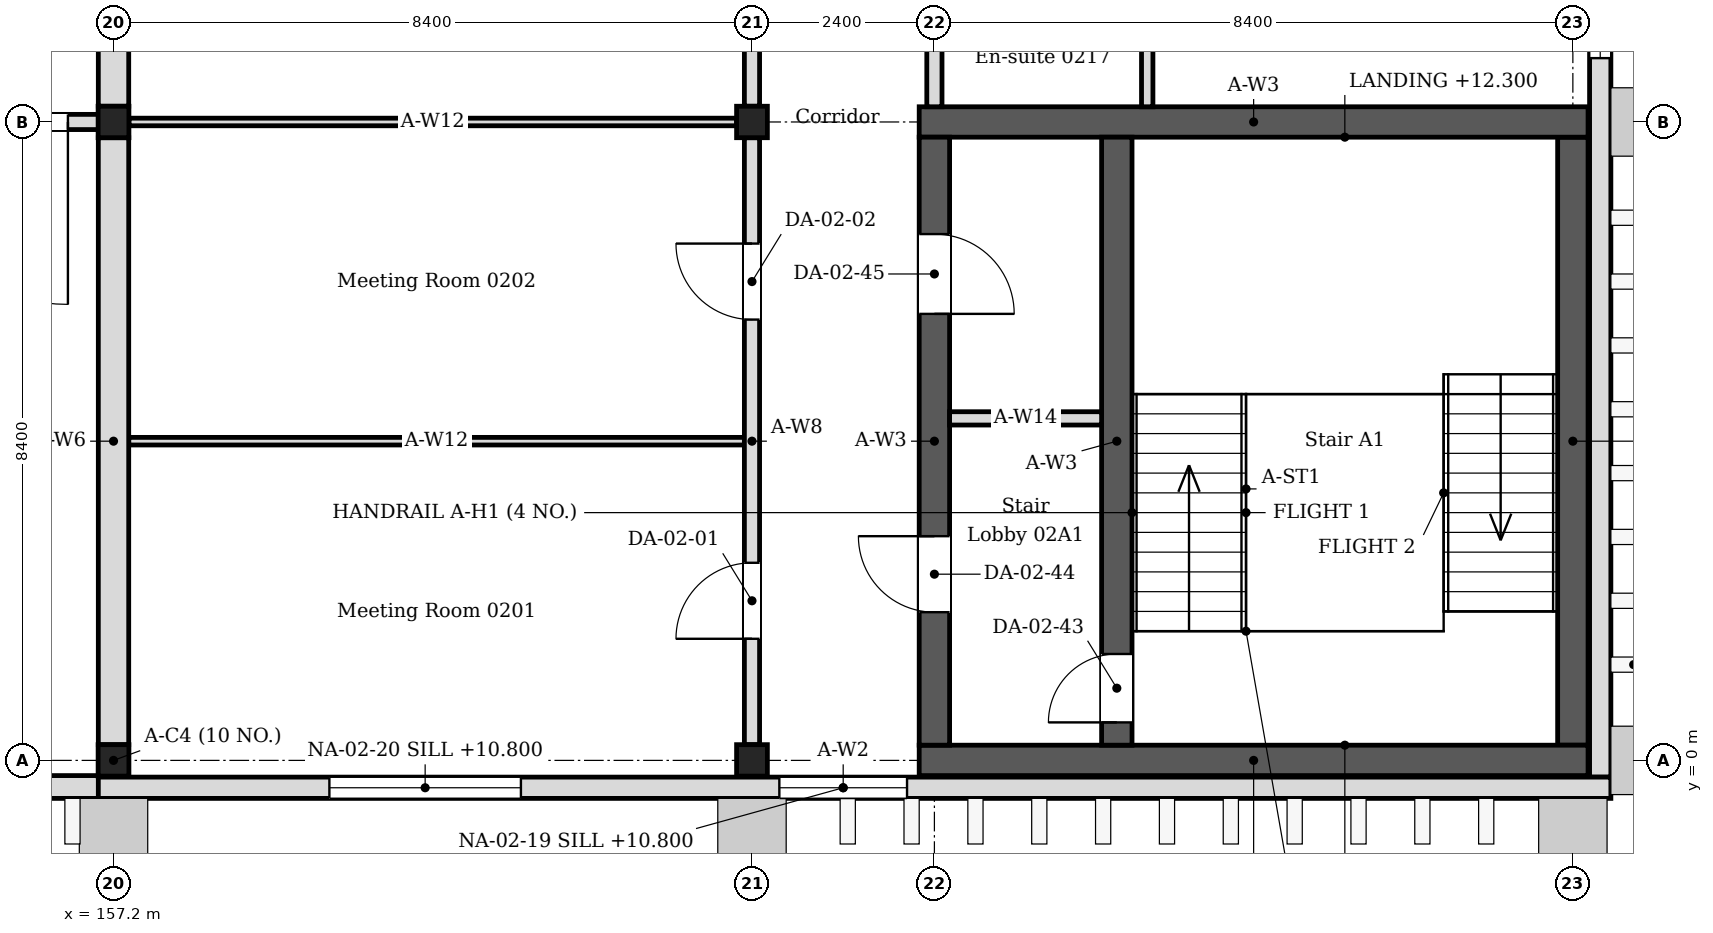
"""IFC4 building model, lengths in metres.
Left out: names, types, materials, properties, quantities, classifications, styles, units other than length and angle.
Written with IfcOpenShell. Run it as: python <this file> out.ifc"""

import sys

from ifc_helpers import new_model, si_unit, direction, frame, frame_2d, origin, origin_2d, place, context, subcontext, project, spatial, rectangle, i_section, extrude, element, fill, save


model = new_model("IFC4")
c1 = context("Model", 3, precision=1e-05, world=origin(), true_north=direction((0.0, 1.0)))
c2 = subcontext(c1, "Body", "Model", "MODEL_VIEW")
j1 = project(units=[si_unit("LENGTHUNIT", "METRE"), si_unit("PLANEANGLEUNIT", "RADIAN")], contexts=[c1])
p1 = place(None, origin())
s1 = spatial("IfcSite", under=j1, at=p1, CompositionType="ELEMENT")
p2 = place(p1, origin())
s2 = spatial("IfcBuilding", under=s1, at=p2, CompositionType="ELEMENT")
p3 = place(p2, frame((0.0, 0.0, 10.2)))
s3 = spatial("IfcBuildingStorey", under=s2, at=p3, CompositionType="ELEMENT", Elevation=10.2)
for number, where, z_axis, x_axis in (
    (1, (157.2, 0.0, 0.0), (0.0, 0.0, 1.0), (1.0, 0.0, 0.0)),
    (2, (157.2, 8.4, 0.0), (0.0, 0.0, 1.0), (1.0, 0.0, 0.0)),
    (3, (165.6, 0.0, 0.0), (0.0, 0.0, 1.0), (1.0, 0.0, 0.0)),
    (4, (165.6, 8.4, 0.0), (0.0, 0.0, 1.0), (1.0, 0.0, 0.0)),
):
    element("IfcColumn", number, at=place(p3, frame(where, z_axis=z_axis, x_axis=x_axis)), inside=s3, PredefinedType="COLUMN", context=c2, shape_type="SweptSolid", body=[
        extrude(i_section(OverallWidth=0.405, OverallDepth=0.414, WebThickness=0.018, FlangeThickness=0.028, FilletRadius=0.022, at=origin_2d()), origin(), (0.0, 0.0, 1.0), 4.2),
    ])
for number, where, z_axis, x_axis in (
    (5, (167.8, 0.0, 0.0), (0.0, 0.0, 1.0), (1.0, 0.0, 0.0)),
    (6, (167.8, 8.4, 0.0), (0.0, 0.0, 1.0), (1.0, 0.0, 0.0)),
):
    element("IfcWall", number, at=place(p3, frame(where, z_axis=z_axis, x_axis=x_axis)), inside=s3, PredefinedType="SOLIDWALL", context=c2, shape_type="SweptSolid", body=[
        extrude(rectangle(XDim=8.8, YDim=0.4, at=frame_2d((4.4, 0.0))), origin(), (0.0, 0.0, 1.0), 4.05),
    ])
p4 = place(p3, frame((168.0, 0.2, 0.0), z_axis=(0.0, 0.0, 1.0), x_axis=(0.0, 1.0, 0.0)))
e7 = element("IfcWall", 7, at=p4, inside=s3, PredefinedType="SOLIDWALL", context=c2, shape_type="SweptSolid", body=[
    extrude(rectangle(XDim=8.0, YDim=0.4, at=frame_2d((4.0, 0.0))), origin(), (0.0, 0.0, 1.0), 4.05),
])
p5 = place(p4, frame((1.75, 0.0, 0.0)))
e8 = element("IfcOpeningElement", 8, at=p5, cuts=e7, PredefinedType="OPENING", context=c2, shape_type="SweptSolid", body=[
    extrude(rectangle(XDim=1.0, YDim=2.1, at=frame_2d((0.5, 1.05))), frame((0.0, 0.21, 0.0), z_axis=(0.0, -1.0, 0.0), x_axis=(1.0, 0.0, 0.0)), (0.0, 0.0, 1.0), 0.42),
])
p6 = place(p4, frame((5.675, 0.0, 0.0)))
e9 = element("IfcOpeningElement", 9, at=p6, cuts=e7, PredefinedType="OPENING", context=c2, shape_type="SweptSolid", body=[
    extrude(rectangle(XDim=1.05, YDim=2.1, at=frame_2d((0.525, 1.05))), frame((0.0, 0.21, 0.0), z_axis=(0.0, -1.0, 0.0), x_axis=(1.0, 0.0, 0.0)), (0.0, 0.0, 1.0), 0.42),
])
p7 = place(p3, frame((176.4, 0.2, 0.0), z_axis=(0.0, 0.0, 1.0), x_axis=(0.0, 1.0, 0.0)))
e10 = element("IfcWall", 10, at=p7, inside=s3, PredefinedType="SOLIDWALL", context=c2, shape_type="SweptSolid", body=[
    extrude(rectangle(XDim=8.0, YDim=0.4, at=frame_2d((4.0, 0.0))), origin(), (0.0, 0.0, 1.0), 4.05),
])
p8 = place(p3, frame((176.76, -0.22, 0.0), z_axis=(0.0, 0.0, 1.0), x_axis=(0.0, 1.0, 0.0)))
e11 = element("IfcWall", 11, at=p8, inside=s3, PredefinedType="SOLIDWALL", context=c2, shape_type="SweptSolid", body=[
    extrude(rectangle(XDim=42.57, YDim=0.28, at=frame_2d((21.285, 0.0))), origin(), (0.0, 0.0, 1.0), 4.05),
])
p9 = place(p8, frame((9.46, 0.0, 0.6)))
e12 = element("IfcOpeningElement", 12, at=p9, cuts=e11, PredefinedType="OPENING", context=c2, shape_type="SweptSolid", body=[
    extrude(rectangle(XDim=2.52, YDim=2.4, at=frame_2d((1.26, 1.2))), frame((0.0, 0.15, 0.0), z_axis=(0.0, -1.0, 0.0), x_axis=(1.0, 0.0, 0.0)), (0.0, 0.0, 1.0), 0.3),
])
p10 = place(p8, frame((13.66, 0.0, 0.6)))
e13 = element("IfcOpeningElement", 13, at=p10, cuts=e11, PredefinedType="OPENING", context=c2, shape_type="SweptSolid", body=[
    extrude(rectangle(XDim=2.52, YDim=2.4, at=frame_2d((1.26, 1.2))), frame((0.0, 0.15, 0.0), z_axis=(0.0, -1.0, 0.0), x_axis=(1.0, 0.0, 0.0)), (0.0, 0.0, 1.0), 0.3),
])
p11 = place(p8, frame((17.86, 0.0, 0.6)))
e14 = element("IfcOpeningElement", 14, at=p11, cuts=e11, PredefinedType="OPENING", context=c2, shape_type="SweptSolid", body=[
    extrude(rectangle(XDim=2.52, YDim=2.4, at=frame_2d((1.26, 1.2))), frame((0.0, 0.15, 0.0), z_axis=(0.0, -1.0, 0.0), x_axis=(1.0, 0.0, 0.0)), (0.0, 0.0, 1.0), 0.3),
])
p12 = place(p8, frame((22.06, 0.0, 0.6)))
e15 = element("IfcOpeningElement", 15, at=p12, cuts=e11, PredefinedType="OPENING", context=c2, shape_type="SweptSolid", body=[
    extrude(rectangle(XDim=2.52, YDim=2.4, at=frame_2d((1.26, 1.2))), frame((0.0, 0.15, 0.0), z_axis=(0.0, -1.0, 0.0), x_axis=(1.0, 0.0, 0.0)), (0.0, 0.0, 1.0), 0.3),
])
p13 = place(p3, frame((156.7, -0.36, 0.0), z_axis=(0.0, 0.0, 1.0), x_axis=(1.0, 0.0, 0.0)))
e16 = element("IfcWall", 16, at=p13, inside=s3, PredefinedType="SOLIDWALL", context=c2, shape_type="SweptSolid", body=[
    extrude(rectangle(XDim=20.2, YDim=0.28, at=frame_2d((10.1, 0.0))), origin(), (0.0, 0.0, 1.0), 4.05),
])
p14 = place(p13, frame((9.26, 0.0, 0.6)))
e17 = element("IfcOpeningElement", 17, at=p14, cuts=e16, PredefinedType="OPENING", context=c2, shape_type="SweptSolid", body=[
    extrude(rectangle(XDim=1.68, YDim=2.4, at=frame_2d((0.84, 1.2))), frame((0.0, 0.15, 0.0), z_axis=(0.0, -1.0, 0.0), x_axis=(1.0, 0.0, 0.0)), (0.0, 0.0, 1.0), 0.3),
])
p15 = place(p13, frame((3.34, 0.0, 0.6)))
e18 = element("IfcOpeningElement", 18, at=p15, cuts=e16, PredefinedType="OPENING", context=c2, shape_type="SweptSolid", body=[
    extrude(rectangle(XDim=2.52, YDim=2.4, at=frame_2d((1.26, 1.2))), frame((0.0, 0.15, 0.0), z_axis=(0.0, -1.0, 0.0), x_axis=(1.0, 0.0, 0.0)), (0.0, 0.0, 1.0), 0.3),
])
p16 = place(p3, frame((150.8, -0.35, 0.0), z_axis=(0.0, 0.0, 1.0), x_axis=(1.0, 0.0, 0.0)))
e19 = element("IfcWall", 19, at=p16, inside=s3, PredefinedType="SOLIDWALL", context=c2, shape_type="SweptSolid", body=[
    extrude(rectangle(XDim=6.2, YDim=0.3, at=frame_2d((3.1, 0.0))), origin(), (0.0, 0.0, 1.0), 4.05),
])
p17 = place(p16, frame((0.64, 0.0, 0.3)))
e20 = element("IfcOpeningElement", 20, at=p17, cuts=e19, PredefinedType="OPENING", context=c2, shape_type="SweptSolid", body=[
    extrude(rectangle(XDim=1.2, YDim=3.3, at=frame_2d((0.6, 1.65))), frame((0.0, 0.16, 0.0), z_axis=(0.0, -1.0, 0.0), x_axis=(1.0, 0.0, 0.0)), (0.0, 0.0, 1.0), 0.32),
])
p18 = place(p16, frame((2.32, 0.0, 0.3)))
e21 = element("IfcOpeningElement", 21, at=p18, cuts=e19, PredefinedType="OPENING", context=c2, shape_type="SweptSolid", body=[
    extrude(rectangle(XDim=1.2, YDim=3.3, at=frame_2d((0.6, 1.65))), frame((0.0, 0.16, 0.0), z_axis=(0.0, -1.0, 0.0), x_axis=(1.0, 0.0, 0.0)), (0.0, 0.0, 1.0), 0.32),
])
p19 = place(p16, frame((4.0, 0.0, 0.3)))
e22 = element("IfcOpeningElement", 22, at=p19, cuts=e19, PredefinedType="OPENING", context=c2, shape_type="SweptSolid", body=[
    extrude(rectangle(XDim=1.2, YDim=3.3, at=frame_2d((0.6, 1.65))), frame((0.0, 0.16, 0.0), z_axis=(0.0, -1.0, 0.0), x_axis=(1.0, 0.0, 0.0)), (0.0, 0.0, 1.0), 0.32),
])
p20 = place(p3, frame((170.8, 8.6, 0.0), z_axis=(0.0, 0.0, 1.0), x_axis=(0.0, 1.0, 0.0)))
e23 = element("IfcWall", 23, at=p20, inside=s3, PredefinedType="PARTITIONING", context=c2, shape_type="SweptSolid", body=[
    extrude(rectangle(XDim=2.2, YDim=0.15, at=frame_2d((1.1, 0.0))), origin(), (0.0, 0.0, 1.0), 4.05),
])
p21 = place(p3, frame((157.403, 8.4, 0.0), z_axis=(0.0, 0.0, 1.0), x_axis=(1.0, 0.0, 0.0)))
e24 = element("IfcWall", 24, at=p21, inside=s3, PredefinedType="PARTITIONING", context=c2, shape_type="SweptSolid", body=[
    extrude(rectangle(XDim=7.995, YDim=0.1, at=frame_2d((3.998, 0.0))), origin(), (0.0, 0.0, 1.0), 3.604),
])
p22 = place(p3, frame((157.4, 4.2, 0.0), z_axis=(0.0, 0.0, 1.0), x_axis=(1.0, 0.0, 0.0)))
e25 = element("IfcWall", 25, at=p22, inside=s3, PredefinedType="PARTITIONING", context=c2, shape_type="SweptSolid", body=[
    extrude(rectangle(XDim=8.1, YDim=0.1, at=frame_2d((4.05, 0.0))), origin(), (0.0, 0.0, 1.0), 3.604),
])
for number, where, z_axis, x_axis in (
    (26, (157.2, 0.207, 0.0), (0.0, 0.0, 1.0), (0.0, 1.0, 0.0)),
    (27, (157.2, 8.607, 0.0), (0.0, 0.0, 1.0), (0.0, 1.0, 0.0)),
):
    element("IfcWall", number, at=place(p3, frame(where, z_axis=z_axis, x_axis=x_axis)), inside=s3, PredefinedType="SOLIDWALL", context=c2, shape_type="SweptSolid", body=[
        extrude(rectangle(XDim=7.986, YDim=0.4, at=frame_2d((3.993, 0.0))), origin(), (0.0, 0.0, 1.0), 3.45),
    ])
p23 = place(p3, frame((165.6, 0.207, 0.0), z_axis=(0.0, 0.0, 1.0), x_axis=(0.0, 1.0, 0.0)))
e28 = element("IfcWall", 28, at=p23, inside=s3, PredefinedType="PARTITIONING", context=c2, shape_type="SweptSolid", body=[
    extrude(rectangle(XDim=7.986, YDim=0.2, at=frame_2d((3.993, 0.0))), origin(), (0.0, 0.0, 1.0), 3.45),
])
p24 = place(p23, frame((1.393, 0.0, 0.0)))
e29 = element("IfcOpeningElement", 29, at=p24, cuts=e28, PredefinedType="OPENING", context=c2, shape_type="SweptSolid", body=[
    extrude(rectangle(XDim=1.0, YDim=2.1, at=frame_2d((0.5, 1.05))), frame((0.0, 0.11, 0.0), z_axis=(0.0, -1.0, 0.0), x_axis=(1.0, 0.0, 0.0)), (0.0, 0.0, 1.0), 0.22),
])
p25 = place(p23, frame((5.593, 0.0, 0.0)))
e30 = element("IfcOpeningElement", 30, at=p25, cuts=e28, PredefinedType="OPENING", context=c2, shape_type="SweptSolid", body=[
    extrude(rectangle(XDim=1.0, YDim=2.1, at=frame_2d((0.5, 1.05))), frame((0.0, 0.11, 0.0), z_axis=(0.0, -1.0, 0.0), x_axis=(1.0, 0.0, 0.0)), (0.0, 0.0, 1.0), 0.22),
])
p26 = place(p3, frame((165.6, 8.607, 0.0), z_axis=(0.0, 0.0, 1.0), x_axis=(0.0, 1.0, 0.0)))
e31 = element("IfcWall", 31, at=p26, inside=s3, PredefinedType="PARTITIONING", context=c2, shape_type="SweptSolid", body=[
    extrude(rectangle(XDim=7.986, YDim=0.2, at=frame_2d((3.993, 0.0))), origin(), (0.0, 0.0, 1.0), 3.45),
])
p27 = place(p26, frame((1.393, 0.0, 0.0)))
e32 = element("IfcOpeningElement", 32, at=p27, cuts=e31, PredefinedType="OPENING", context=c2, shape_type="SweptSolid", body=[
    extrude(rectangle(XDim=1.0, YDim=2.1, at=frame_2d((0.5, 1.05))), frame((0.0, 0.11, 0.0), z_axis=(0.0, -1.0, 0.0), x_axis=(1.0, 0.0, 0.0)), (0.0, 0.0, 1.0), 0.22),
])
p28 = place(p26, frame((5.593, 0.0, 0.0)))
e33 = element("IfcOpeningElement", 33, at=p28, cuts=e31, PredefinedType="OPENING", context=c2, shape_type="SweptSolid", body=[
    extrude(rectangle(XDim=1.0, YDim=2.1, at=frame_2d((0.5, 1.05))), frame((0.0, 0.11, 0.0), z_axis=(0.0, -1.0, 0.0), x_axis=(1.0, 0.0, 0.0)), (0.0, 0.0, 1.0), 0.22),
])
p29 = place(p3, frame((168.0, 8.6, 0.0), z_axis=(0.0, 0.0, 1.0), x_axis=(0.0, 1.0, 0.0)))
e34 = element("IfcWall", 34, at=p29, inside=s3, PredefinedType="PARTITIONING", context=c2, shape_type="SweptSolid", body=[
    extrude(rectangle(XDim=7.993, YDim=0.2, at=frame_2d((3.997, 0.0))), origin(), (0.0, 0.0, 1.0), 3.45),
])
p30 = place(p29, frame((2.5, 0.0, 0.0)))
e35 = element("IfcOpeningElement", 35, at=p30, cuts=e34, PredefinedType="OPENING", context=c2, shape_type="SweptSolid", body=[
    extrude(rectangle(XDim=1.2, YDim=2.1, at=frame_2d((0.6, 1.05))), frame((0.0, 0.11, 0.0), z_axis=(0.0, -1.0, 0.0), x_axis=(1.0, 0.0, 0.0)), (0.0, 0.0, 1.0), 0.22),
])
p31 = place(p29, frame((4.3, 0.0, 0.0)))
e36 = element("IfcOpeningElement", 36, at=p31, cuts=e34, PredefinedType="OPENING", context=c2, shape_type="SweptSolid", body=[
    extrude(rectangle(XDim=1.2, YDim=2.1, at=frame_2d((0.6, 1.05))), frame((0.0, 0.11, 0.0), z_axis=(0.0, -1.0, 0.0), x_axis=(1.0, 0.0, 0.0)), (0.0, 0.0, 1.0), 0.22),
])
p32 = place(p3, frame((170.4, 0.2, 0.0), z_axis=(0.0, 0.0, 1.0), x_axis=(0.0, 1.0, 0.0)))
e37 = element("IfcWall", 37, at=p32, inside=s3, PredefinedType="SOLIDWALL", context=c2, shape_type="SweptSolid", body=[
    extrude(rectangle(XDim=8.0, YDim=0.4, at=frame_2d((4.0, 0.0))), origin(), (0.0, 0.0, 1.0), 4.05),
])
p33 = place(p32, frame((0.3, 0.0, 0.0)))
e38 = element("IfcOpeningElement", 38, at=p33, cuts=e37, PredefinedType="OPENING", context=c2, shape_type="SweptSolid", body=[
    extrude(rectangle(XDim=0.9, YDim=2.1, at=frame_2d((0.45, 1.05))), frame((0.0, 0.21, 0.0), z_axis=(0.0, -1.0, 0.0), x_axis=(1.0, 0.0, 0.0)), (0.0, 0.0, 1.0), 0.42),
])
p34 = place(p3, frame((168.2, 4.5, 0.0), z_axis=(0.0, 0.0, 1.0), x_axis=(1.0, 0.0, 0.0)))
e39 = element("IfcWall", 39, at=p34, inside=s3, PredefinedType="PARTITIONING", context=c2, shape_type="SweptSolid", body=[
    extrude(rectangle(XDim=2.0, YDim=0.175, at=frame_2d((1.0, 0.0))), origin(), (0.0, 0.0, 1.0), 4.05),
])
p35 = place(p3, frame((151.35, 8.4, 0.0), z_axis=(0.0, 0.0, 1.0), x_axis=(1.0, 0.0, 0.0)))
e40 = element("IfcWall", 40, at=p35, inside=s3, PredefinedType="PARTITIONING", context=c2, shape_type="SweptSolid", body=[
    extrude(rectangle(XDim=5.85, YDim=0.2, at=frame_2d((2.925, 0.0))), origin(), (0.0, 0.0, 1.0), 3.35),
])
p36 = place(p35, frame((2.85, 0.0, 0.0)))
e41 = element("IfcOpeningElement", 41, at=p36, cuts=e40, PredefinedType="OPENING", context=c2, shape_type="SweptSolid", body=[
    extrude(rectangle(XDim=2.4, YDim=2.2, at=frame_2d((1.2, 1.1))), frame((0.0, 0.11, 0.0), z_axis=(0.0, -1.0, 0.0), x_axis=(1.0, 0.0, 0.0)), (0.0, 0.0, 1.0), 0.22),
])
p37 = place(p9, origin())
e42 = element("IfcWindow", 42, at=p37, inside=s3, PartitioningType="SINGLE_PANEL", PredefinedType="WINDOW", context=c2, shape_type="SweptSolid", body=[
    extrude(rectangle(XDim=2.52, YDim=2.4, at=frame_2d((1.26, 1.2))), frame((0.0, 0.03, 0.0), z_axis=(0.0, -1.0, 0.0), x_axis=(1.0, 0.0, 0.0)), (0.0, 0.0, 1.0), 0.06),
])
fill(e12, e42)
p38 = place(p14, origin())
e43 = element("IfcWindow", 43, at=p38, inside=s3, PartitioningType="SINGLE_PANEL", PredefinedType="WINDOW", context=c2, shape_type="SweptSolid", body=[
    extrude(rectangle(XDim=1.68, YDim=2.4, at=frame_2d((0.84, 1.2))), frame((0.0, 0.03, 0.0), z_axis=(0.0, -1.0, 0.0), x_axis=(1.0, 0.0, 0.0)), (0.0, 0.0, 1.0), 0.06),
])
fill(e17, e43)
p39 = place(p15, origin())
e44 = element("IfcWindow", 44, at=p39, inside=s3, PartitioningType="SINGLE_PANEL", PredefinedType="WINDOW", context=c2, shape_type="SweptSolid", body=[
    extrude(rectangle(XDim=2.52, YDim=2.4, at=frame_2d((1.26, 1.2))), frame((0.0, 0.03, 0.0), z_axis=(0.0, -1.0, 0.0), x_axis=(1.0, 0.0, 0.0)), (0.0, 0.0, 1.0), 0.06),
])
fill(e18, e44)
p40 = place(p24, origin())
e45 = element("IfcDoor", 45, at=p40, inside=s3, OperationType="SINGLE_SWING_LEFT", PredefinedType="DOOR", context=c2, shape_type="SweptSolid", body=[
    extrude(rectangle(XDim=1.0, YDim=2.1, at=frame_2d((0.5, 1.05))), frame((0.0, 0.025, 0.0), z_axis=(0.0, -1.0, 0.0), x_axis=(1.0, 0.0, 0.0)), (0.0, 0.0, 1.0), 0.05),
])
fill(e29, e45)
p41 = place(p25, origin())
e46 = element("IfcDoor", 46, at=p41, inside=s3, OperationType="SINGLE_SWING_RIGHT", PredefinedType="DOOR", context=c2, shape_type="SweptSolid", body=[
    extrude(rectangle(XDim=1.0, YDim=2.1, at=frame_2d((0.5, 1.05))), frame((0.0, 0.025, 0.0), z_axis=(0.0, -1.0, 0.0), x_axis=(1.0, 0.0, 0.0)), (0.0, 0.0, 1.0), 0.05),
])
fill(e30, e46)
p42 = place(p33, origin())
e47 = element("IfcDoor", 47, at=p42, inside=s3, OperationType="SINGLE_SWING_LEFT", PredefinedType="DOOR", context=c2, shape_type="SweptSolid", body=[
    extrude(rectangle(XDim=0.9, YDim=2.1, at=frame_2d((0.45, 1.05))), frame((0.0, 0.025, 0.0), z_axis=(0.0, -1.0, 0.0), x_axis=(1.0, 0.0, 0.0)), (0.0, 0.0, 1.0), 0.05),
])
fill(e38, e47)
p43 = place(p5, origin())
e48 = element("IfcDoor", 48, at=p43, inside=s3, OperationType="SINGLE_SWING_RIGHT", PredefinedType="DOOR", context=c2, shape_type="SweptSolid", body=[
    extrude(rectangle(XDim=1.0, YDim=2.1, at=frame_2d((0.5, 1.05))), frame((0.0, 0.025, 0.0), z_axis=(0.0, -1.0, 0.0), x_axis=(1.0, 0.0, 0.0)), (0.0, 0.0, 1.0), 0.05),
])
fill(e8, e48)
p44 = place(p6, origin())
e49 = element("IfcDoor", 49, at=p44, inside=s3, OperationType="SINGLE_SWING_LEFT", PredefinedType="DOOR", context=c2, shape_type="SweptSolid", body=[
    extrude(rectangle(XDim=1.05, YDim=2.1, at=frame_2d((0.525, 1.05))), frame((0.0, 0.025, 0.0), z_axis=(0.0, -1.0, 0.0), x_axis=(1.0, 0.0, 0.0)), (0.0, 0.0, 1.0), 0.05),
])
fill(e9, e49)
p45 = place(p36, origin())
e50 = element("IfcDoor", 50, at=p45, inside=s3, OperationType="DOUBLE_DOOR_SINGLE_SWING", PredefinedType="DOOR", context=c2, shape_type="SweptSolid", body=[
    extrude(rectangle(XDim=2.4, YDim=2.2, at=frame_2d((1.2, 1.1))), frame((0.0, 0.025, 0.0), z_axis=(0.0, -1.0, 0.0), x_axis=(1.0, 0.0, 0.0)), (0.0, 0.0, 1.0), 0.05),
])
fill(e41, e50)
save(model, sys.argv[1])
